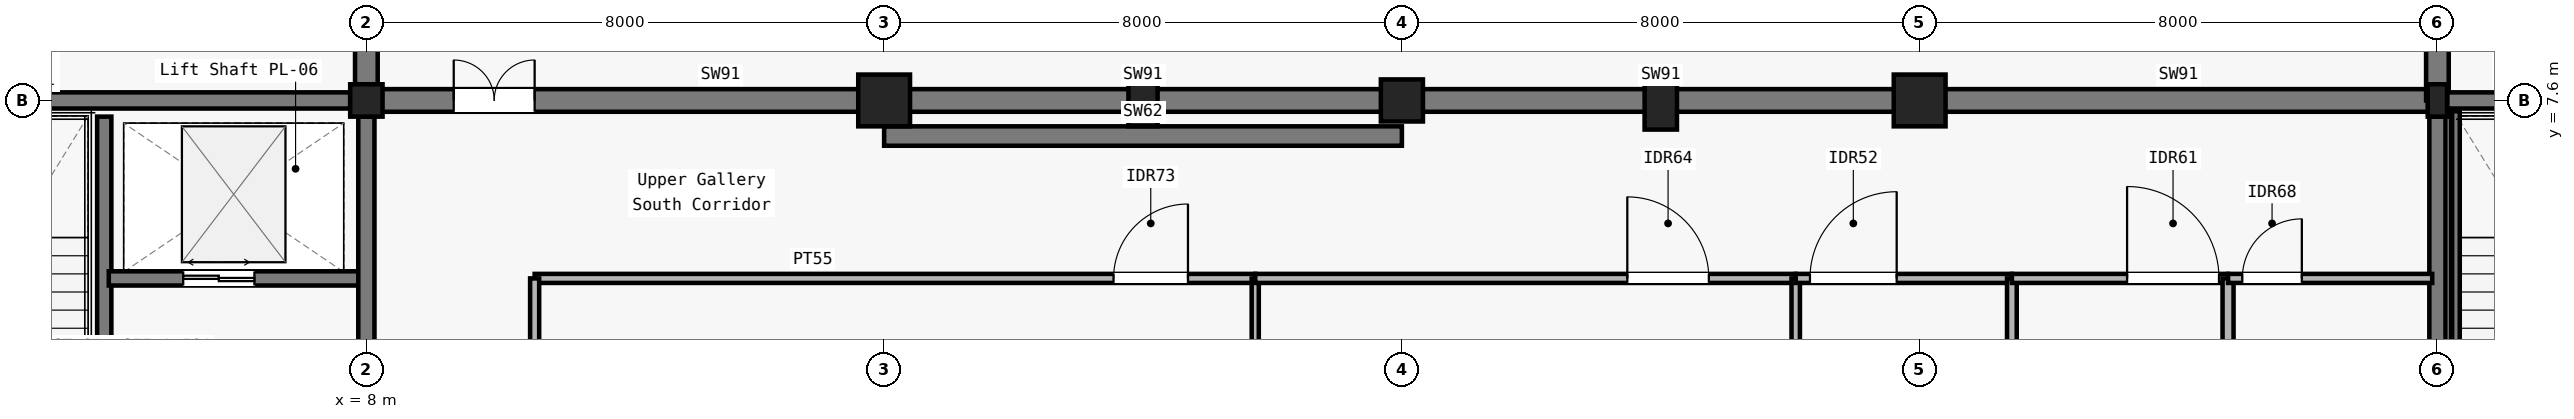
"""IFC4 building model, lengths in metres.
Left out: names, types, materials, properties, quantities, classifications, styles, units other than length and angle.
Written with IfcOpenShell. Run it as: python <this file> out.ifc"""

import sys

from ifc_helpers import new_model, si_unit, direction, frame, frame_2d, origin, origin_2d, place, context, subcontext, project, spatial, rectangle, circle, i_section, extrude, element, fill, save


model = new_model("IFC4")
c1 = context("Model", 3, precision=1e-05, world=origin(), true_north=direction((0.0, 1.0)))
c2 = subcontext(c1, "Body", "Model", "MODEL_VIEW")
j1 = project(units=[si_unit("LENGTHUNIT", "METRE"), si_unit("PLANEANGLEUNIT", "RADIAN")], contexts=[c1])
p1 = place(None, origin())
s1 = spatial("IfcSite", under=j1, at=p1, CompositionType="ELEMENT")
p2 = place(p1, origin())
s2 = spatial("IfcBuilding", under=s1, at=p2, CompositionType="ELEMENT")
p3 = place(p2, frame((0.0, 0.0, 10.2)))
s3 = spatial("IfcBuildingStorey", under=s2, at=p3, CompositionType="ELEMENT", Elevation=10.2)
p4 = place(p3, frame((8.0, 7.6, 0.0), z_axis=(0.0, 0.0, 1.0), x_axis=(1.0, 0.0, 0.0)))
e1 = element("IfcColumn", 1, at=p4, inside=s3, PredefinedType="COLUMN", context=c2, shape_type="SweptSolid", body=[
    extrude(rectangle(XDim=0.5, YDim=0.5, at=origin_2d()), origin(), (0.0, 0.0, 1.0), 4.8),
])
p5 = place(p3, frame((16.0, 7.6, 0.0), z_axis=(0.0, 0.0, 1.0), x_axis=(1.0, 0.0, 0.0)))
e2 = element("IfcColumn", 2, at=p5, inside=s3, PredefinedType="COLUMN", context=c2, shape_type="SweptSolid", body=[
    extrude(circle(Radius=0.4, at=origin_2d()), origin(), (0.0, 0.0, 1.0), 4.8),
])
p6 = place(p3, frame((24.0, 7.6, 0.0), z_axis=(0.0, 0.0, 1.0), x_axis=(1.0, 0.0, 0.0)))
e3 = element("IfcColumn", 3, at=p6, inside=s3, PredefinedType="COLUMN", context=c2, shape_type="SweptSolid", body=[
    extrude(circle(Radius=0.325, at=origin_2d()), origin(), (0.0, 0.0, 1.0), 4.8),
])
p7 = place(p3, frame((32.0, 7.6, 0.0), z_axis=(0.0, 0.0, 1.0), x_axis=(1.0, 0.0, 0.0)))
e4 = element("IfcColumn", 4, at=p7, inside=s3, PredefinedType="COLUMN", context=c2, shape_type="SweptSolid", body=[
    extrude(rectangle(XDim=0.8, YDim=0.8, at=origin_2d()), origin(), (0.0, 0.0, 1.0), 4.8),
])
p8 = place(p3, frame((40.0, 7.6, 0.0), z_axis=(0.0, 0.0, 1.0), x_axis=(1.0, 0.0, 0.0)))
e5 = element("IfcColumn", 5, at=p8, inside=s3, PredefinedType="COLUMN", context=c2, shape_type="SweptSolid", body=[
    extrude(i_section(OverallWidth=0.3, OverallDepth=0.5, WebThickness=0.014, FlangeThickness=0.028, FilletRadius=0.027, at=origin_2d()), origin(), (0.0, 0.0, 1.0), 4.8),
])
p9 = place(p3, frame((20.0, 7.6, 0.0), z_axis=(0.0, 0.0, 1.0), x_axis=(1.0, 0.0, 0.0)))
e6 = element("IfcColumn", 6, at=p9, inside=s3, PredefinedType="PILASTER", context=c2, shape_type="SweptSolid", body=[
    extrude(rectangle(XDim=0.45, YDim=0.8, at=origin_2d()), origin(), (0.0, 0.0, 1.0), 4.8),
])
p10 = place(p3, frame((28.0, 7.6, 0.0), z_axis=(0.0, 0.0, 1.0), x_axis=(1.0, 0.0, 0.0)))
e7 = element("IfcColumn", 7, at=p10, inside=s3, PredefinedType="PILASTER", context=c2, shape_type="SweptSolid", body=[
    extrude(rectangle(XDim=0.5, YDim=0.9, at=origin_2d()), origin(), (0.0, 0.0, 1.0), 4.8),
])
p11 = place(p3, frame((8.0, 7.6, 0.0), z_axis=(0.0, 0.0, 1.0), x_axis=(1.0, 0.0, 0.0)))
e8 = element("IfcWall", 8, at=p11, inside=s3, PredefinedType="SHEAR", context=c2, shape_type="SweptSolid", body=[
    extrude(rectangle(XDim=8.0, YDim=0.35, at=frame_2d((4.0, 0.0))), origin(), (0.0, 0.0, 1.0), 4.52),
])
p12 = place(p11, frame((1.35, 0.0, 0.0)))
e9 = element("IfcOpeningElement", 9, at=p12, cuts=e8, PredefinedType="OPENING", context=c2, shape_type="SweptSolid", body=[
    extrude(rectangle(XDim=1.25, YDim=2.2, at=frame_2d((0.625, 1.1))), frame((0.0, 0.185, 0.0), z_axis=(0.0, -1.0, 0.0), x_axis=(1.0, 0.0, 0.0)), (0.0, 0.0, 1.0), 0.37),
])
for number, where, z_axis, x_axis in (
    (10, (16.0, 7.6, 0.0), (0.0, 0.0, 1.0), (1.0, 0.0, 0.0)),
    (11, (24.0, 7.6, 0.0), (0.0, 0.0, 1.0), (1.0, 0.0, 0.0)),
    (12, (32.0, 7.6, 0.0), (0.0, 0.0, 1.0), (1.0, 0.0, 0.0)),
):
    element("IfcWall", number, at=place(p3, frame(where, z_axis=z_axis, x_axis=x_axis)), inside=s3, PredefinedType="SHEAR", context=c2, shape_type="SweptSolid", body=[
        extrude(rectangle(XDim=8.0, YDim=0.35, at=frame_2d((4.0, 0.0))), origin(), (0.0, 0.0, 1.0), 4.52),
    ])
for number, where, z_axis, x_axis in (
    (13, (8.0, 7.6, 0.0), (0.0, 0.0, 1.0), (0.0, 1.0, 0.0)),
    (14, (40.0, 7.6, 0.0), (0.0, 0.0, 1.0), (0.0, 1.0, 0.0)),
):
    element("IfcWall", number, at=place(p3, frame(where, z_axis=z_axis, x_axis=x_axis)), inside=s3, PredefinedType="SHEAR", context=c2, shape_type="SweptSolid", body=[
        extrude(rectangle(XDim=7.6, YDim=0.35, at=frame_2d((3.8, 0.0))), origin(), (0.0, 0.0, 1.0), 4.52),
    ])
p13 = place(p3, frame((16.0, 7.05, 0.0), z_axis=(0.0, 0.0, 1.0), x_axis=(1.0, 0.0, 0.0)))
e15 = element("IfcWall", 15, at=p13, inside=s3, PredefinedType="SHEAR", context=c2, shape_type="SweptSolid", body=[
    extrude(rectangle(XDim=8.0, YDim=0.3, at=frame_2d((4.0, 0.0))), origin(), (0.0, 0.0, 1.0), 4.52),
])
p14 = place(p3, frame((0.3, 7.6, 0.0), z_axis=(0.0, 0.0, 1.0), x_axis=(1.0, 0.0, 0.0)))
e16 = element("IfcWall", 16, at=p14, inside=s3, PredefinedType="SOLIDWALL", context=c2, shape_type="SweptSolid", body=[
    extrude(rectangle(XDim=7.45, YDim=0.25, at=frame_2d((3.725, 0.0))), origin(), (0.0, 0.0, 1.0), 3.77),
])
p15 = place(p3, frame((3.95, 0.25, 0.0), z_axis=(0.0, 0.0, 1.0), x_axis=(0.0, 1.0, 0.0)))
e17 = element("IfcWall", 17, at=p15, inside=s3, PredefinedType="SOLIDWALL", context=c2, shape_type="SweptSolid", body=[
    extrude(rectangle(XDim=7.1, YDim=0.22, at=frame_2d((3.55, 0.0))), origin(), (0.0, 0.0, 1.0), 4.52),
])
p16 = place(p15, frame((0.35, 0.0, 0.0)))
e18 = element("IfcOpeningElement", 18, at=p16, cuts=e17, PredefinedType="OPENING", context=c2, shape_type="SweptSolid", body=[
    extrude(rectangle(XDim=1.2, YDim=2.15, at=frame_2d((0.6, 1.075))), frame((0.0, 0.12, 0.0), z_axis=(0.0, -1.0, 0.0), x_axis=(1.0, 0.0, 0.0)), (0.0, 0.0, 1.0), 0.24),
])
p17 = place(p3, frame((4.02, 4.85, 0.0), z_axis=(0.0, 0.0, 1.0), x_axis=(1.0, 0.0, 0.0)))
e19 = element("IfcWall", 19, at=p17, inside=s3, PredefinedType="SOLIDWALL", context=c2, shape_type="SweptSolid", body=[
    extrude(rectangle(XDim=3.93, YDim=0.22, at=frame_2d((1.965, 0.0))), origin(), (0.0, 0.0, 1.0), 3.895),
])
p18 = place(p17, frame((1.15, 0.0, 0.0)))
e20 = element("IfcOpeningElement", 20, at=p18, cuts=e19, PredefinedType="OPENING", context=c2, shape_type="SweptSolid", body=[
    extrude(rectangle(XDim=1.1, YDim=2.2, at=frame_2d((0.55, 1.1))), frame((0.0, 0.12, 0.0), z_axis=(0.0, -1.0, 0.0), x_axis=(1.0, 0.0, 0.0)), (0.0, 0.0, 1.0), 0.24),
])
p19 = place(p3, frame((8.0, 0.3, 0.0), z_axis=(0.0, 0.0, 1.0), x_axis=(0.0, 1.0, 0.0)))
e21 = element("IfcWall", 21, at=p19, inside=s3, PredefinedType="SOLIDWALL", context=c2, shape_type="SweptSolid", body=[
    extrude(rectangle(XDim=7.05, YDim=0.25, at=frame_2d((3.525, 0.0))), origin(), (0.0, 0.0, 1.0), 3.745),
])
p20 = place(p19, frame((2.05, 0.0, 0.0)))
e22 = element("IfcOpeningElement", 22, at=p20, cuts=e21, PredefinedType="OPENING", context=c2, shape_type="SweptSolid", body=[
    extrude(rectangle(XDim=1.35, YDim=2.2, at=frame_2d((0.675, 1.1))), frame((0.0, 0.135, 0.0), z_axis=(0.0, -1.0, 0.0), x_axis=(1.0, 0.0, 0.0)), (0.0, 0.0, 1.0), 0.27),
])
p21 = place(p3, frame((40.0, 0.25, 0.0), z_axis=(0.0, 0.0, 1.0), x_axis=(0.0, 1.0, 0.0)))
e23 = element("IfcWall", 23, at=p21, inside=s3, PredefinedType="SOLIDWALL", context=c2, shape_type="SweptSolid", body=[
    extrude(rectangle(XDim=7.1, YDim=0.25, at=frame_2d((3.55, 0.0))), origin(), (0.0, 0.0, 1.0), 3.41),
])
p22 = place(p3, frame((40.15, 7.6, 0.0), z_axis=(0.0, 0.0, 1.0), x_axis=(1.0, 0.0, 0.0)))
e24 = element("IfcWall", 24, at=p22, inside=s3, PredefinedType="SOLIDWALL", context=c2, shape_type="SweptSolid", body=[
    extrude(rectangle(XDim=7.77, YDim=0.25, at=frame_2d((3.885, 0.0))), origin(), (0.0, 0.0, 1.0), 3.41),
])
p23 = place(p3, frame((10.6, 4.85, 0.0), z_axis=(0.0, 0.0, 1.0), x_axis=(1.0, 0.0, 0.0)))
e25 = element("IfcWall", 25, at=p23, inside=s3, PredefinedType="PARTITIONING", context=c2, shape_type="SweptSolid", body=[
    extrude(rectangle(XDim=11.134, YDim=0.14, at=frame_2d((5.567, 0.0))), origin(), (0.0, 0.0, 1.0), 3.875),
])
p24 = place(p23, frame((8.945, 0.0, 0.0)))
e26 = element("IfcOpeningElement", 26, at=p24, cuts=e25, PredefinedType="OPENING", context=c2, shape_type="SweptSolid", body=[
    extrude(rectangle(XDim=1.15, YDim=2.15, at=frame_2d((0.575, 1.075))), frame((0.0, 0.08, 0.0), z_axis=(0.0, -1.0, 0.0), x_axis=(1.0, 0.0, 0.0)), (0.0, 0.0, 1.0), 0.16),
])
p25 = place(p3, frame((21.734, 0.08, 0.0), z_axis=(0.0, 0.0, 1.0), x_axis=(0.0, 1.0, 0.0)))
e27 = element("IfcWall", 27, at=p25, inside=s3, PredefinedType="PARTITIONING", context=c2, shape_type="SweptSolid", body=[
    extrude(rectangle(XDim=4.77, YDim=0.11, at=frame_2d((2.385, 0.0))), origin(), (0.0, 0.0, 1.0), 3.77),
])
p26 = place(p3, frame((21.734, 4.85, 0.0), z_axis=(0.0, 0.0, 1.0), x_axis=(1.0, 0.0, 0.0)))
e28 = element("IfcWall", 28, at=p26, inside=s3, PredefinedType="PARTITIONING", context=c2, shape_type="SweptSolid", body=[
    extrude(rectangle(XDim=8.351, YDim=0.14, at=frame_2d((4.176, 0.0))), origin(), (0.0, 0.0, 1.0), 3.85),
])
p27 = place(p26, frame((5.749, 0.0, 0.0)))
e29 = element("IfcOpeningElement", 29, at=p27, cuts=e28, PredefinedType="OPENING", context=c2, shape_type="SweptSolid", body=[
    extrude(rectangle(XDim=1.26, YDim=2.2, at=frame_2d((0.63, 1.1))), frame((0.0, 0.08, 0.0), z_axis=(0.0, -1.0, 0.0), x_axis=(1.0, 0.0, 0.0)), (0.0, 0.0, 1.0), 0.16),
])
p28 = place(p3, frame((30.085, 0.08, 0.0), z_axis=(0.0, 0.0, 1.0), x_axis=(0.0, 1.0, 0.0)))
e30 = element("IfcWall", 30, at=p28, inside=s3, PredefinedType="PARTITIONING", context=c2, shape_type="SweptSolid", body=[
    extrude(rectangle(XDim=4.77, YDim=0.13, at=frame_2d((2.385, 0.0))), origin(), (0.0, 0.0, 1.0), 3.745),
])
p29 = place(p3, frame((30.085, 4.85, 0.0), z_axis=(0.0, 0.0, 1.0), x_axis=(1.0, 0.0, 0.0)))
e31 = element("IfcWall", 31, at=p29, inside=s3, PredefinedType="PARTITIONING", context=c2, shape_type="SweptSolid", body=[
    extrude(rectangle(XDim=3.34, YDim=0.14, at=frame_2d((1.67, 0.0))), origin(), (0.0, 0.0, 1.0), 3.745),
])
p30 = place(p29, frame((0.22, 0.0, 0.0)))
e32 = element("IfcOpeningElement", 32, at=p30, cuts=e31, PredefinedType="OPENING", context=c2, shape_type="SweptSolid", body=[
    extrude(rectangle(XDim=1.34, YDim=2.2, at=frame_2d((0.67, 1.1))), frame((0.0, 0.08, 0.0), z_axis=(0.0, -1.0, 0.0), x_axis=(1.0, 0.0, 0.0)), (0.0, 0.0, 1.0), 0.16),
])
p31 = place(p3, frame((33.425, 0.08, 0.0), z_axis=(0.0, 0.0, 1.0), x_axis=(0.0, 1.0, 0.0)))
e33 = element("IfcWall", 33, at=p31, inside=s3, PredefinedType="PARTITIONING", context=c2, shape_type="SweptSolid", body=[
    extrude(rectangle(XDim=4.77, YDim=0.15, at=frame_2d((2.385, 0.0))), origin(), (0.0, 0.0, 1.0), 3.915),
])
p32 = place(p3, frame((33.425, 4.85, 0.0), z_axis=(0.0, 0.0, 1.0), x_axis=(1.0, 0.0, 0.0)))
e34 = element("IfcWall", 34, at=p32, inside=s3, PredefinedType="PARTITIONING", context=c2, shape_type="SweptSolid", body=[
    extrude(rectangle(XDim=3.34, YDim=0.14, at=frame_2d((1.67, 0.0))), origin(), (0.0, 0.0, 1.0), 3.955),
])
p33 = place(p32, frame((1.78, 0.0, 0.0)))
e35 = element("IfcOpeningElement", 35, at=p33, cuts=e34, PredefinedType="OPENING", context=c2, shape_type="SweptSolid", body=[
    extrude(rectangle(XDim=1.42, YDim=2.2, at=frame_2d((0.71, 1.1))), frame((0.0, 0.08, 0.0), z_axis=(0.0, -1.0, 0.0), x_axis=(1.0, 0.0, 0.0)), (0.0, 0.0, 1.0), 0.16),
])
p34 = place(p3, frame((36.765, 0.08, 0.0), z_axis=(0.0, 0.0, 1.0), x_axis=(0.0, 1.0, 0.0)))
e36 = element("IfcWall", 36, at=p34, inside=s3, PredefinedType="PARTITIONING", context=c2, shape_type="SweptSolid", body=[
    extrude(rectangle(XDim=4.77, YDim=0.17, at=frame_2d((2.385, 0.0))), origin(), (0.0, 0.0, 1.0), 3.915),
])
p35 = place(p3, frame((36.765, 4.85, 0.0), z_axis=(0.0, 0.0, 1.0), x_axis=(1.0, 0.0, 0.0)))
e37 = element("IfcWall", 37, at=p35, inside=s3, PredefinedType="PARTITIONING", context=c2, shape_type="SweptSolid", body=[
    extrude(rectangle(XDim=3.155, YDim=0.14, at=frame_2d((1.578, 0.0))), origin(), (0.0, 0.0, 1.0), 3.695),
])
p36 = place(p35, frame((0.22, 0.0, 0.0)))
e38 = element("IfcOpeningElement", 38, at=p36, cuts=e37, PredefinedType="OPENING", context=c2, shape_type="SweptSolid", body=[
    extrude(rectangle(XDim=0.92, YDim=2.05, at=frame_2d((0.46, 1.025))), frame((0.0, 0.08, 0.0), z_axis=(0.0, -1.0, 0.0), x_axis=(1.0, 0.0, 0.0)), (0.0, 0.0, 1.0), 0.16),
])
p37 = place(p3, frame((10.6, 0.08, 0.0), z_axis=(0.0, 0.0, 1.0), x_axis=(0.0, 1.0, 0.0)))
e39 = element("IfcWall", 39, at=p37, inside=s3, PredefinedType="PARTITIONING", context=c2, shape_type="SweptSolid", body=[
    extrude(rectangle(XDim=4.77, YDim=0.14, at=frame_2d((2.385, 0.0))), origin(), (0.0, 0.0, 1.0), 3.89),
])
p38 = place(p3, frame((40.275, 0.15, 0.0), z_axis=(0.0, 0.0, 1.0), x_axis=(0.0, 1.0, 0.0)))
e40 = element("IfcWall", 40, at=p38, inside=s3, PredefinedType="SOLIDWALL", context=c2, shape_type="SweptSolid", body=[
    extrude(rectangle(XDim=7.3, YDim=0.14, at=frame_2d((3.65, 0.0))), origin(), (0.0, 0.0, 1.0), 4.52),
])
p39 = place(p18, origin())
e41 = element("IfcDoor", 41, at=p39, inside=s3, OperationType="DOUBLE_DOOR_SLIDING", PredefinedType="DOOR", context=c2, shape_type="SweptSolid", body=[
    extrude(rectangle(XDim=1.1, YDim=2.2, at=frame_2d((0.55, 1.1))), frame((0.0, 0.025, 0.0), z_axis=(0.0, -1.0, 0.0), x_axis=(1.0, 0.0, 0.0)), (0.0, 0.0, 1.0), 0.05),
])
fill(e20, e41)
p40 = place(p24, origin())
e42 = element("IfcDoor", 42, at=p40, inside=s3, OperationType="SINGLE_SWING_RIGHT", PredefinedType="DOOR", context=c2, shape_type="SweptSolid", body=[
    extrude(rectangle(XDim=1.15, YDim=2.15, at=frame_2d((0.575, 1.075))), frame((0.0, 0.025, 0.0), z_axis=(0.0, -1.0, 0.0), x_axis=(1.0, 0.0, 0.0)), (0.0, 0.0, 1.0), 0.05),
])
fill(e26, e42)
p41 = place(p27, origin())
e43 = element("IfcDoor", 43, at=p41, inside=s3, OperationType="SINGLE_SWING_LEFT", PredefinedType="DOOR", context=c2, shape_type="SweptSolid", body=[
    extrude(rectangle(XDim=1.26, YDim=2.2, at=frame_2d((0.63, 1.1))), frame((0.0, 0.025, 0.0), z_axis=(0.0, -1.0, 0.0), x_axis=(1.0, 0.0, 0.0)), (0.0, 0.0, 1.0), 0.05),
])
fill(e29, e43)
p42 = place(p30, origin())
e44 = element("IfcDoor", 44, at=p42, inside=s3, OperationType="SINGLE_SWING_RIGHT", PredefinedType="DOOR", context=c2, shape_type="SweptSolid", body=[
    extrude(rectangle(XDim=1.34, YDim=2.2, at=frame_2d((0.67, 1.1))), frame((0.0, 0.025, 0.0), z_axis=(0.0, -1.0, 0.0), x_axis=(1.0, 0.0, 0.0)), (0.0, 0.0, 1.0), 0.05),
])
fill(e32, e44)
p43 = place(p33, origin())
e45 = element("IfcDoor", 45, at=p43, inside=s3, OperationType="SINGLE_SWING_LEFT", PredefinedType="DOOR", context=c2, shape_type="SweptSolid", body=[
    extrude(rectangle(XDim=1.42, YDim=2.2, at=frame_2d((0.71, 1.1))), frame((0.0, 0.025, 0.0), z_axis=(0.0, -1.0, 0.0), x_axis=(1.0, 0.0, 0.0)), (0.0, 0.0, 1.0), 0.05),
])
fill(e35, e45)
p44 = place(p36, origin())
e46 = element("IfcDoor", 46, at=p44, inside=s3, OperationType="SINGLE_SWING_RIGHT", PredefinedType="DOOR", context=c2, shape_type="SweptSolid", body=[
    extrude(rectangle(XDim=0.92, YDim=2.05, at=frame_2d((0.46, 1.025))), frame((0.0, 0.025, 0.0), z_axis=(0.0, -1.0, 0.0), x_axis=(1.0, 0.0, 0.0)), (0.0, 0.0, 1.0), 0.05),
])
fill(e38, e46)
p45 = place(p12, origin())
e47 = element("IfcDoor", 47, at=p45, inside=s3, OperationType="DOUBLE_DOOR_SINGLE_SWING", PredefinedType="DOOR", context=c2, shape_type="SweptSolid", body=[
    extrude(rectangle(XDim=1.25, YDim=2.2, at=frame_2d((0.625, 1.1))), frame((0.0, 0.025, 0.0), z_axis=(0.0, -1.0, 0.0), x_axis=(1.0, 0.0, 0.0)), (0.0, 0.0, 1.0), 0.05),
])
fill(e9, e47)
save(model, sys.argv[1])
